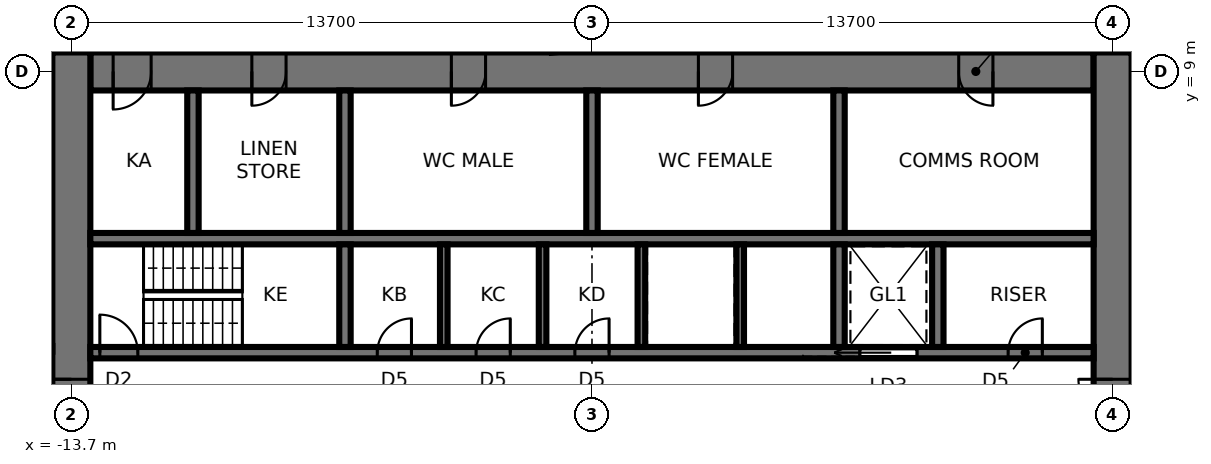
"""IFC4 building model, lengths in metres.
Left out: names, types, materials, properties, quantities, classifications, styles, units other than length and angle.
Written with IfcOpenShell. Run it as: python <this file> out.ifc"""

import sys

from ifc_helpers import new_model, si_unit, direction, frame, frame_2d, origin, place, context, subcontext, project, spatial, rectangle, extrude, element, fill, save


model = new_model("IFC4")
c1 = context("Model", 3, precision=1e-05, world=origin(), true_north=direction((0.0, 1.0)))
c2 = subcontext(c1, "Body", "Model", "MODEL_VIEW")
j1 = project(units=[si_unit("LENGTHUNIT", "METRE"), si_unit("PLANEANGLEUNIT", "RADIAN")], contexts=[c1])
p1 = place(None, origin())
s1 = spatial("IfcSite", under=j1, at=p1, CompositionType="ELEMENT")
p2 = place(p1, origin())
s2 = spatial("IfcBuilding", under=s1, at=p2, CompositionType="ELEMENT")
p3 = place(p2, frame((0.0, 0.0, 162.6)))
s3 = spatial("IfcBuildingStorey", under=s2, at=p3, CompositionType="ELEMENT", Elevation=162.6)
p4 = place(p3, frame((13.2, 9.0, 0.0), z_axis=(0.0, 0.0, 1.0), x_axis=(-1.0, 0.0, 0.0)))
e1 = element("IfcWall", 1, at=p4, inside=s3, PredefinedType="SHEAR", context=c2, shape_type="SweptSolid", body=[
    extrude(rectangle(XDim=26.4, YDim=1.0, at=frame_2d((13.2, 0.0))), origin(), (0.0, 0.0, 1.0), 3.9),
])
p5 = place(p4, frame((2.65, 0.0, 0.0)))
e2 = element("IfcOpeningElement", 2, at=p5, cuts=e1, PredefinedType="OPENING", context=c2, shape_type="SweptSolid", body=[
    extrude(rectangle(XDim=0.9, YDim=2.1, at=frame_2d((0.45, 1.05))), frame((0.0, 0.51, 0.0), z_axis=(0.0, -1.0, 0.0), x_axis=(1.0, 0.0, 0.0)), (0.0, 0.0, 1.0), 1.02),
])
p6 = place(p4, frame((9.5, 0.0, 0.0)))
e3 = element("IfcOpeningElement", 3, at=p6, cuts=e1, PredefinedType="OPENING", context=c2, shape_type="SweptSolid", body=[
    extrude(rectangle(XDim=0.9, YDim=2.1, at=frame_2d((0.45, 1.05))), frame((0.0, 0.51, 0.0), z_axis=(0.0, -1.0, 0.0), x_axis=(1.0, 0.0, 0.0)), (0.0, 0.0, 1.0), 1.02),
])
p7 = place(p4, frame((16.0, 0.0, 0.0)))
e4 = element("IfcOpeningElement", 4, at=p7, cuts=e1, PredefinedType="OPENING", context=c2, shape_type="SweptSolid", body=[
    extrude(rectangle(XDim=0.9, YDim=2.1, at=frame_2d((0.45, 1.05))), frame((0.0, 0.51, 0.0), z_axis=(0.0, -1.0, 0.0), x_axis=(1.0, 0.0, 0.0)), (0.0, 0.0, 1.0), 1.02),
])
p8 = place(p4, frame((21.25, 0.0, 0.0)))
e5 = element("IfcOpeningElement", 5, at=p8, cuts=e1, PredefinedType="OPENING", context=c2, shape_type="SweptSolid", body=[
    extrude(rectangle(XDim=0.9, YDim=2.1, at=frame_2d((0.45, 1.05))), frame((0.0, 0.51, 0.0), z_axis=(0.0, -1.0, 0.0), x_axis=(1.0, 0.0, 0.0)), (0.0, 0.0, 1.0), 1.02),
])
p9 = place(p4, frame((24.8, 0.0, 0.0)))
e6 = element("IfcOpeningElement", 6, at=p9, cuts=e1, PredefinedType="OPENING", context=c2, shape_type="SweptSolid", body=[
    extrude(rectangle(XDim=1.0, YDim=2.1, at=frame_2d((0.5, 1.05))), frame((0.0, 0.51, 0.0), z_axis=(0.0, -1.0, 0.0), x_axis=(1.0, 0.0, 0.0)), (0.0, 0.0, 1.0), 1.02),
])
p10 = place(p3, frame((13.7, -9.5, 0.0), z_axis=(0.0, 0.0, 1.0), x_axis=(0.0, 1.0, 0.0)))
e7 = element("IfcWall", 7, at=p10, inside=s3, PredefinedType="SHEAR", context=c2, shape_type="SweptSolid", body=[
    extrude(rectangle(XDim=19.0, YDim=1.0, at=frame_2d((9.5, 0.0))), origin(), (0.0, 0.0, 1.0), 3.9),
])
p11 = place(p10, frame((8.6, 0.0, 0.0)))
e8 = element("IfcOpeningElement", 8, at=p11, cuts=e7, PredefinedType="OPENING", context=c2, shape_type="SweptSolid", body=[
    extrude(rectangle(XDim=1.8, YDim=2.4, at=frame_2d((0.9, 1.2))), frame((0.0, 0.51, 0.0), z_axis=(0.0, -1.0, 0.0), x_axis=(1.0, 0.0, 0.0)), (0.0, 0.0, 1.0), 1.02),
])
p12 = place(p3, frame((-13.7, 9.5, 0.0), z_axis=(0.0, 0.0, 1.0), x_axis=(0.0, -1.0, 0.0)))
e9 = element("IfcWall", 9, at=p12, inside=s3, PredefinedType="SHEAR", context=c2, shape_type="SweptSolid", body=[
    extrude(rectangle(XDim=19.0, YDim=1.0, at=frame_2d((9.5, 0.0))), origin(), (0.0, 0.0, 1.0), 3.9),
])
p13 = place(p12, frame((8.6, 0.0, 0.0)))
e10 = element("IfcOpeningElement", 10, at=p13, cuts=e9, PredefinedType="OPENING", context=c2, shape_type="SweptSolid", body=[
    extrude(rectangle(XDim=1.8, YDim=2.4, at=frame_2d((0.9, 1.2))), frame((0.0, 0.51, 0.0), z_axis=(0.0, -1.0, 0.0), x_axis=(1.0, 0.0, 0.0)), (0.0, 0.0, 1.0), 1.02),
])
p14 = place(p3, frame((-13.2, 1.6, 0.0), z_axis=(0.0, 0.0, 1.0), x_axis=(1.0, 0.0, 0.0)))
e11 = element("IfcWall", 11, at=p14, inside=s3, PredefinedType="SHEAR", context=c2, shape_type="SweptSolid", body=[
    extrude(rectangle(XDim=26.4, YDim=0.3, at=frame_2d((13.2, 0.0))), origin(), (0.0, 0.0, 1.0), 3.9),
])
p15 = place(p14, frame((0.25, 0.0, 0.0)))
e12 = element("IfcOpeningElement", 12, at=p15, cuts=e11, PredefinedType="OPENING", context=c2, shape_type="SweptSolid", body=[
    extrude(rectangle(XDim=1.0, YDim=2.1, at=frame_2d((0.5, 1.05))), frame((0.0, 0.16, 0.0), z_axis=(0.0, -1.0, 0.0), x_axis=(1.0, 0.0, 0.0)), (0.0, 0.0, 1.0), 0.32),
])
p16 = place(p14, frame((20.25, 0.0, 0.0)))
e13 = element("IfcOpeningElement", 13, at=p16, cuts=e11, PredefinedType="OPENING", context=c2, shape_type="SweptSolid", body=[
    extrude(rectangle(XDim=1.5, YDim=2.4, at=frame_2d((0.75, 1.2))), frame((0.0, 0.16, 0.0), z_axis=(0.0, -1.0, 0.0), x_axis=(1.0, 0.0, 0.0)), (0.0, 0.0, 1.0), 0.32),
])
p17 = place(p14, frame((7.55, 0.0, 0.0)))
e14 = element("IfcOpeningElement", 14, at=p17, cuts=e11, PredefinedType="OPENING", context=c2, shape_type="SweptSolid", body=[
    extrude(rectangle(XDim=0.9, YDim=2.1, at=frame_2d((0.45, 1.05))), frame((0.0, 0.16, 0.0), z_axis=(0.0, -1.0, 0.0), x_axis=(1.0, 0.0, 0.0)), (0.0, 0.0, 1.0), 0.32),
])
p18 = place(p14, frame((10.15, 0.0, 0.0)))
e15 = element("IfcOpeningElement", 15, at=p18, cuts=e11, PredefinedType="OPENING", context=c2, shape_type="SweptSolid", body=[
    extrude(rectangle(XDim=0.9, YDim=2.1, at=frame_2d((0.45, 1.05))), frame((0.0, 0.16, 0.0), z_axis=(0.0, -1.0, 0.0), x_axis=(1.0, 0.0, 0.0)), (0.0, 0.0, 1.0), 0.32),
])
p19 = place(p14, frame((12.75, 0.0, 0.0)))
e16 = element("IfcOpeningElement", 16, at=p19, cuts=e11, PredefinedType="OPENING", context=c2, shape_type="SweptSolid", body=[
    extrude(rectangle(XDim=0.9, YDim=2.1, at=frame_2d((0.45, 1.05))), frame((0.0, 0.16, 0.0), z_axis=(0.0, -1.0, 0.0), x_axis=(1.0, 0.0, 0.0)), (0.0, 0.0, 1.0), 0.32),
])
p20 = place(p14, frame((24.15, 0.0, 0.0)))
e17 = element("IfcOpeningElement", 17, at=p20, cuts=e11, PredefinedType="OPENING", context=c2, shape_type="SweptSolid", body=[
    extrude(rectangle(XDim=0.9, YDim=2.1, at=frame_2d((0.45, 1.05))), frame((0.0, 0.16, 0.0), z_axis=(0.0, -1.0, 0.0), x_axis=(1.0, 0.0, 0.0)), (0.0, 0.0, 1.0), 0.32),
])
p21 = place(p3, frame((-13.2, 4.6, 0.0), z_axis=(0.0, 0.0, 1.0), x_axis=(1.0, 0.0, 0.0)))
e18 = element("IfcWall", 18, at=p21, inside=s3, PredefinedType="SHEAR", context=c2, shape_type="SweptSolid", body=[
    extrude(rectangle(XDim=26.4, YDim=0.3, at=frame_2d((13.2, 0.0))), origin(), (0.0, 0.0, 1.0), 3.9),
])
p22 = place(p3, frame((-6.5, 1.75, 0.0), z_axis=(0.0, 0.0, 1.0), x_axis=(0.0, 1.0, 0.0)))
e19 = element("IfcWall", 19, at=p22, inside=s3, PredefinedType="SHEAR", context=c2, shape_type="SweptSolid", body=[
    extrude(rectangle(XDim=2.7, YDim=0.3, at=frame_2d((1.35, 0.0))), origin(), (0.0, 0.0, 1.0), 3.9),
])
p23 = place(p3, frame((-6.5, 4.75, 0.0), z_axis=(0.0, 0.0, 1.0), x_axis=(0.0, 1.0, 0.0)))
e20 = element("IfcWall", 20, at=p23, inside=s3, PredefinedType="SHEAR", context=c2, shape_type="SweptSolid", body=[
    extrude(rectangle(XDim=3.75, YDim=0.3, at=frame_2d((1.875, 0.0))), origin(), (0.0, 0.0, 1.0), 3.9),
])
p24 = place(p3, frame((6.5, 1.75, 0.0), z_axis=(0.0, 0.0, 1.0), x_axis=(0.0, 1.0, 0.0)))
e21 = element("IfcWall", 21, at=p24, inside=s3, PredefinedType="SHEAR", context=c2, shape_type="SweptSolid", body=[
    extrude(rectangle(XDim=2.7, YDim=0.3, at=frame_2d((1.35, 0.0))), origin(), (0.0, 0.0, 1.0), 3.9),
])
p25 = place(p3, frame((6.5, 4.75, 0.0), z_axis=(0.0, 0.0, 1.0), x_axis=(0.0, 1.0, 0.0)))
e22 = element("IfcWall", 22, at=p25, inside=s3, PredefinedType="SHEAR", context=c2, shape_type="SweptSolid", body=[
    extrude(rectangle(XDim=3.75, YDim=0.3, at=frame_2d((1.875, 0.0))), origin(), (0.0, 0.0, 1.0), 3.9),
])
for number, where, z_axis, x_axis in (
    (23, (-3.9, 1.75, 0.0), (0.0, 0.0, 1.0), (0.0, 1.0, 0.0)),
    (24, (-1.3, 1.75, 0.0), (0.0, 0.0, 1.0), (0.0, 1.0, 0.0)),
    (25, (1.3, 1.75, 0.0), (0.0, 0.0, 1.0), (0.0, 1.0, 0.0)),
    (26, (3.9, 1.75, 0.0), (0.0, 0.0, 1.0), (0.0, 1.0, 0.0)),
):
    element("IfcWall", number, at=place(p3, frame(where, z_axis=z_axis, x_axis=x_axis)), inside=s3, PredefinedType="SHEAR", context=c2, shape_type="SweptSolid", body=[
        extrude(rectangle(XDim=2.7, YDim=0.2, at=frame_2d((1.35, 0.0))), origin(), (0.0, 0.0, 1.0), 3.9),
    ])
for number, where, z_axis, x_axis in (
    (27, (0.0, 4.75, 0.0), (0.0, 0.0, 1.0), (0.0, 1.0, 0.0)),
    (28, (-10.5, 4.75, 0.0), (0.0, 0.0, 1.0), (0.0, 1.0, 0.0)),
):
    element("IfcWall", number, at=place(p3, frame(where, z_axis=z_axis, x_axis=x_axis)), inside=s3, PredefinedType="SHEAR", context=c2, shape_type="SweptSolid", body=[
        extrude(rectangle(XDim=3.75, YDim=0.3, at=frame_2d((1.875, 0.0))), origin(), (0.0, 0.0, 1.0), 3.9),
    ])
p26 = place(p3, frame((9.1, 1.75, 0.0), z_axis=(0.0, 0.0, 1.0), x_axis=(0.0, 1.0, 0.0)))
e29 = element("IfcWall", 29, at=p26, inside=s3, PredefinedType="SHEAR", context=c2, shape_type="SweptSolid", body=[
    extrude(rectangle(XDim=2.7, YDim=0.3, at=frame_2d((1.35, 0.0))), origin(), (0.0, 0.0, 1.0), 3.9),
])
p27 = place(p3, frame((-2.229, 21.212, 0.0), z_axis=(0.0, 0.0, 1.0), x_axis=(0.104525070238, -0.994522251984, 0.0)))
e30 = element("IfcWall", 30, at=p27, inside=s3, PredefinedType="PARTITIONING", context=c2, shape_type="SweptSolid", body=[
    extrude(rectangle(XDim=11.777, YDim=0.12, at=frame_2d((5.888, 0.0))), origin(), (0.0, 0.0, 1.0), 3.7),
])
p28 = place(p27, frame((4.712, 0.0, 0.0)))
e31 = element("IfcOpeningElement", 31, at=p28, cuts=e30, PredefinedType="OPENING", context=c2, shape_type="SweptSolid", body=[
    extrude(rectangle(XDim=1.0, YDim=2.4, at=frame_2d((0.5, 1.2))), frame((0.0, 0.07, 0.0), z_axis=(0.0, -1.0, 0.0), x_axis=(1.0, 0.0, 0.0)), (0.0, 0.0, 1.0), 0.14),
])
p29 = place(p13, frame((1.8, 0.0, 0.0), z_axis=(0.0, 0.0, 1.0), x_axis=(-1.0, 0.0, 0.0)))
e32 = element("IfcDoor", 32, at=p29, inside=s3, OperationType="DOUBLE_DOOR_SINGLE_SWING", PredefinedType="DOOR", context=c2, shape_type="SweptSolid", body=[
    extrude(rectangle(XDim=1.72, YDim=2.36, at=frame_2d((0.9, 1.18))), frame((0.0, 0.025, 0.0), z_axis=(0.0, -1.0, 0.0), x_axis=(1.0, 0.0, 0.0)), (0.0, 0.0, 1.0), 0.05),
    extrude(rectangle(XDim=0.04, YDim=2.4, at=frame_2d((1.78, 1.2))), frame((0.0, 0.25, 0.0), z_axis=(0.0, -1.0, 0.0), x_axis=(1.0, 0.0, 0.0)), (0.0, 0.0, 1.0), 0.5),
    extrude(rectangle(XDim=0.04, YDim=2.4, at=frame_2d((0.02, 1.2))), frame((0.0, 0.25, 0.0), z_axis=(0.0, -1.0, 0.0), x_axis=(1.0, 0.0, 0.0)), (0.0, 0.0, 1.0), 0.5),
    extrude(rectangle(XDim=1.72, YDim=0.04, at=frame_2d((0.9, 2.38))), frame((0.0, 0.25, 0.0), z_axis=(0.0, -1.0, 0.0), x_axis=(1.0, 0.0, 0.0)), (0.0, 0.0, 1.0), 0.5),
])
fill(e10, e32)
p30 = place(p11, origin())
e33 = element("IfcDoor", 33, at=p30, inside=s3, OperationType="DOUBLE_DOOR_SINGLE_SWING", PredefinedType="DOOR", context=c2, shape_type="SweptSolid", body=[
    extrude(rectangle(XDim=1.72, YDim=2.36, at=frame_2d((0.9, 1.18))), frame((0.0, 0.025, 0.0), z_axis=(0.0, -1.0, 0.0), x_axis=(1.0, 0.0, 0.0)), (0.0, 0.0, 1.0), 0.05),
    extrude(rectangle(XDim=0.04, YDim=2.4, at=frame_2d((0.02, 1.2))), frame((0.0, 0.25, 0.0), z_axis=(0.0, -1.0, 0.0), x_axis=(1.0, 0.0, 0.0)), (0.0, 0.0, 1.0), 0.5),
    extrude(rectangle(XDim=0.04, YDim=2.4, at=frame_2d((1.78, 1.2))), frame((0.0, 0.25, 0.0), z_axis=(0.0, -1.0, 0.0), x_axis=(1.0, 0.0, 0.0)), (0.0, 0.0, 1.0), 0.5),
    extrude(rectangle(XDim=1.72, YDim=0.04, at=frame_2d((0.9, 2.38))), frame((0.0, 0.25, 0.0), z_axis=(0.0, -1.0, 0.0), x_axis=(1.0, 0.0, 0.0)), (0.0, 0.0, 1.0), 0.5),
])
fill(e8, e33)
p31 = place(p15, origin())
e34 = element("IfcDoor", 34, at=p31, inside=s3, OperationType="SINGLE_SWING_LEFT", PredefinedType="DOOR", context=c2, shape_type="SweptSolid", body=[
    extrude(rectangle(XDim=1.0, YDim=2.1, at=frame_2d((0.5, 1.05))), frame((0.0, 0.025, 0.0), z_axis=(0.0, -1.0, 0.0), x_axis=(1.0, 0.0, 0.0)), (0.0, 0.0, 1.0), 0.05),
])
fill(e12, e34)
p32 = place(p16, origin())
e35 = element("IfcDoor", 35, at=p32, inside=s3, OperationType="SLIDING_TO_LEFT", PredefinedType="DOOR", context=c2, shape_type="SweptSolid", body=[
    extrude(rectangle(XDim=1.5, YDim=2.4, at=frame_2d((0.75, 1.2))), frame((0.0, 0.025, 0.0), z_axis=(0.0, -1.0, 0.0), x_axis=(1.0, 0.0, 0.0)), (0.0, 0.0, 1.0), 0.05),
])
fill(e13, e35)
p33 = place(p17, origin())
e36 = element("IfcDoor", 36, at=p33, inside=s3, OperationType="SINGLE_SWING_RIGHT", PredefinedType="DOOR", context=c2, shape_type="SweptSolid", body=[
    extrude(rectangle(XDim=0.9, YDim=2.1, at=frame_2d((0.45, 1.05))), frame((0.0, 0.025, 0.0), z_axis=(0.0, -1.0, 0.0), x_axis=(1.0, 0.0, 0.0)), (0.0, 0.0, 1.0), 0.05),
])
fill(e14, e36)
p34 = place(p18, origin())
e37 = element("IfcDoor", 37, at=p34, inside=s3, OperationType="SINGLE_SWING_RIGHT", PredefinedType="DOOR", context=c2, shape_type="SweptSolid", body=[
    extrude(rectangle(XDim=0.9, YDim=2.1, at=frame_2d((0.45, 1.05))), frame((0.0, 0.025, 0.0), z_axis=(0.0, -1.0, 0.0), x_axis=(1.0, 0.0, 0.0)), (0.0, 0.0, 1.0), 0.05),
])
fill(e15, e37)
p35 = place(p19, origin())
e38 = element("IfcDoor", 38, at=p35, inside=s3, OperationType="SINGLE_SWING_RIGHT", PredefinedType="DOOR", context=c2, shape_type="SweptSolid", body=[
    extrude(rectangle(XDim=0.9, YDim=2.1, at=frame_2d((0.45, 1.05))), frame((0.0, 0.025, 0.0), z_axis=(0.0, -1.0, 0.0), x_axis=(1.0, 0.0, 0.0)), (0.0, 0.0, 1.0), 0.05),
])
fill(e16, e38)
p36 = place(p20, origin())
e39 = element("IfcDoor", 39, at=p36, inside=s3, OperationType="SINGLE_SWING_RIGHT", PredefinedType="DOOR", context=c2, shape_type="SweptSolid", body=[
    extrude(rectangle(XDim=0.9, YDim=2.1, at=frame_2d((0.45, 1.05))), frame((0.0, 0.025, 0.0), z_axis=(0.0, -1.0, 0.0), x_axis=(1.0, 0.0, 0.0)), (0.0, 0.0, 1.0), 0.05),
])
fill(e17, e39)
p37 = place(p5, origin())
e40 = element("IfcDoor", 40, at=p37, inside=s3, OperationType="SINGLE_SWING_LEFT", PredefinedType="DOOR", context=c2, shape_type="SweptSolid", body=[
    extrude(rectangle(XDim=0.82, YDim=2.06, at=frame_2d((0.45, 1.03))), frame((0.0, 0.025, 0.0), z_axis=(0.0, -1.0, 0.0), x_axis=(1.0, 0.0, 0.0)), (0.0, 0.0, 1.0), 0.05),
    extrude(rectangle(XDim=0.04, YDim=2.1, at=frame_2d((0.02, 1.05))), frame((0.0, 0.25, 0.0), z_axis=(0.0, -1.0, 0.0), x_axis=(1.0, 0.0, 0.0)), (0.0, 0.0, 1.0), 0.5),
    extrude(rectangle(XDim=0.04, YDim=2.1, at=frame_2d((0.88, 1.05))), frame((0.0, 0.25, 0.0), z_axis=(0.0, -1.0, 0.0), x_axis=(1.0, 0.0, 0.0)), (0.0, 0.0, 1.0), 0.5),
    extrude(rectangle(XDim=0.82, YDim=0.04, at=frame_2d((0.45, 2.08))), frame((0.0, 0.25, 0.0), z_axis=(0.0, -1.0, 0.0), x_axis=(1.0, 0.0, 0.0)), (0.0, 0.0, 1.0), 0.5),
])
fill(e2, e40)
p38 = place(p6, origin())
e41 = element("IfcDoor", 41, at=p38, inside=s3, OperationType="SINGLE_SWING_RIGHT", PredefinedType="DOOR", context=c2, shape_type="SweptSolid", body=[
    extrude(rectangle(XDim=0.82, YDim=2.06, at=frame_2d((0.45, 1.03))), frame((0.0, 0.025, 0.0), z_axis=(0.0, -1.0, 0.0), x_axis=(1.0, 0.0, 0.0)), (0.0, 0.0, 1.0), 0.05),
    extrude(rectangle(XDim=0.04, YDim=2.1, at=frame_2d((0.02, 1.05))), frame((0.0, 0.25, 0.0), z_axis=(0.0, -1.0, 0.0), x_axis=(1.0, 0.0, 0.0)), (0.0, 0.0, 1.0), 0.5),
    extrude(rectangle(XDim=0.04, YDim=2.1, at=frame_2d((0.88, 1.05))), frame((0.0, 0.25, 0.0), z_axis=(0.0, -1.0, 0.0), x_axis=(1.0, 0.0, 0.0)), (0.0, 0.0, 1.0), 0.5),
    extrude(rectangle(XDim=0.82, YDim=0.04, at=frame_2d((0.45, 2.08))), frame((0.0, 0.25, 0.0), z_axis=(0.0, -1.0, 0.0), x_axis=(1.0, 0.0, 0.0)), (0.0, 0.0, 1.0), 0.5),
])
fill(e3, e41)
p39 = place(p7, origin())
e42 = element("IfcDoor", 42, at=p39, inside=s3, OperationType="SINGLE_SWING_RIGHT", PredefinedType="DOOR", context=c2, shape_type="SweptSolid", body=[
    extrude(rectangle(XDim=0.82, YDim=2.06, at=frame_2d((0.45, 1.03))), frame((0.0, 0.025, 0.0), z_axis=(0.0, -1.0, 0.0), x_axis=(1.0, 0.0, 0.0)), (0.0, 0.0, 1.0), 0.05),
    extrude(rectangle(XDim=0.04, YDim=2.1, at=frame_2d((0.02, 1.05))), frame((0.0, 0.25, 0.0), z_axis=(0.0, -1.0, 0.0), x_axis=(1.0, 0.0, 0.0)), (0.0, 0.0, 1.0), 0.5),
    extrude(rectangle(XDim=0.04, YDim=2.1, at=frame_2d((0.88, 1.05))), frame((0.0, 0.25, 0.0), z_axis=(0.0, -1.0, 0.0), x_axis=(1.0, 0.0, 0.0)), (0.0, 0.0, 1.0), 0.5),
    extrude(rectangle(XDim=0.82, YDim=0.04, at=frame_2d((0.45, 2.08))), frame((0.0, 0.25, 0.0), z_axis=(0.0, -1.0, 0.0), x_axis=(1.0, 0.0, 0.0)), (0.0, 0.0, 1.0), 0.5),
])
fill(e4, e42)
p40 = place(p8, origin())
e43 = element("IfcDoor", 43, at=p40, inside=s3, OperationType="SINGLE_SWING_RIGHT", PredefinedType="DOOR", context=c2, shape_type="SweptSolid", body=[
    extrude(rectangle(XDim=0.82, YDim=2.06, at=frame_2d((0.45, 1.03))), frame((0.0, 0.025, 0.0), z_axis=(0.0, -1.0, 0.0), x_axis=(1.0, 0.0, 0.0)), (0.0, 0.0, 1.0), 0.05),
    extrude(rectangle(XDim=0.04, YDim=2.1, at=frame_2d((0.02, 1.05))), frame((0.0, 0.25, 0.0), z_axis=(0.0, -1.0, 0.0), x_axis=(1.0, 0.0, 0.0)), (0.0, 0.0, 1.0), 0.5),
    extrude(rectangle(XDim=0.04, YDim=2.1, at=frame_2d((0.88, 1.05))), frame((0.0, 0.25, 0.0), z_axis=(0.0, -1.0, 0.0), x_axis=(1.0, 0.0, 0.0)), (0.0, 0.0, 1.0), 0.5),
    extrude(rectangle(XDim=0.82, YDim=0.04, at=frame_2d((0.45, 2.08))), frame((0.0, 0.25, 0.0), z_axis=(0.0, -1.0, 0.0), x_axis=(1.0, 0.0, 0.0)), (0.0, 0.0, 1.0), 0.5),
])
fill(e5, e43)
p41 = place(p9, origin())
e44 = element("IfcDoor", 44, at=p41, inside=s3, OperationType="SINGLE_SWING_RIGHT", PredefinedType="DOOR", context=c2, shape_type="SweptSolid", body=[
    extrude(rectangle(XDim=0.92, YDim=2.06, at=frame_2d((0.5, 1.03))), frame((0.0, 0.025, 0.0), z_axis=(0.0, -1.0, 0.0), x_axis=(1.0, 0.0, 0.0)), (0.0, 0.0, 1.0), 0.05),
    extrude(rectangle(XDim=0.04, YDim=2.1, at=frame_2d((0.02, 1.05))), frame((0.0, 0.25, 0.0), z_axis=(0.0, -1.0, 0.0), x_axis=(1.0, 0.0, 0.0)), (0.0, 0.0, 1.0), 0.5),
    extrude(rectangle(XDim=0.04, YDim=2.1, at=frame_2d((0.98, 1.05))), frame((0.0, 0.25, 0.0), z_axis=(0.0, -1.0, 0.0), x_axis=(1.0, 0.0, 0.0)), (0.0, 0.0, 1.0), 0.5),
    extrude(rectangle(XDim=0.92, YDim=0.04, at=frame_2d((0.5, 2.08))), frame((0.0, 0.25, 0.0), z_axis=(0.0, -1.0, 0.0), x_axis=(1.0, 0.0, 0.0)), (0.0, 0.0, 1.0), 0.5),
])
fill(e6, e44)
save(model, sys.argv[1])
